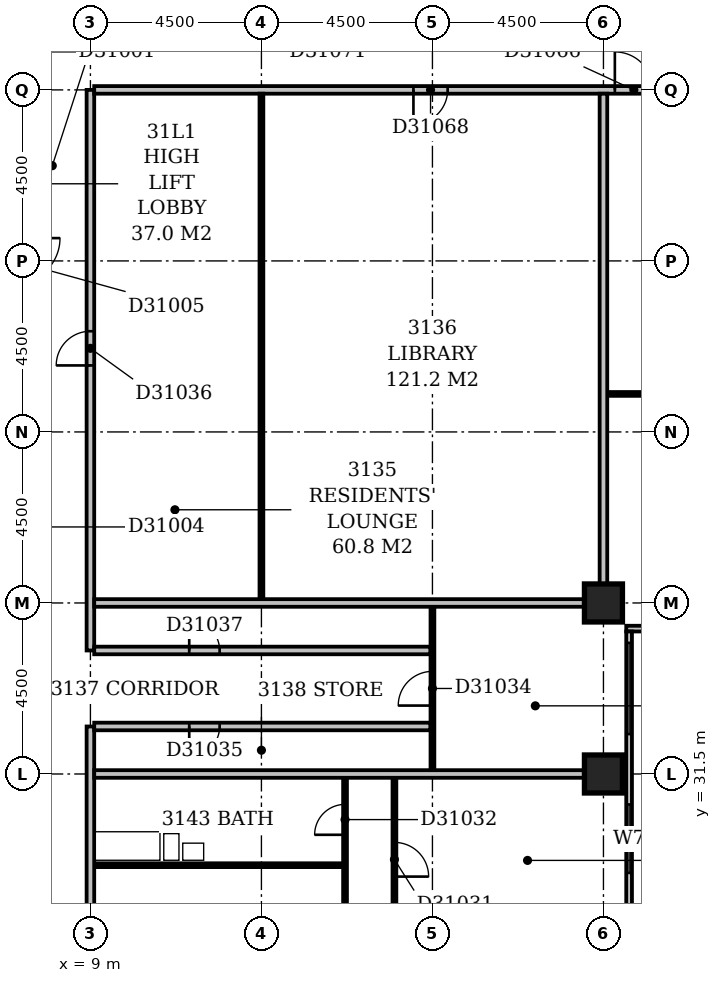
"""IFC4 building model, lengths in metres.
Left out: names, types, materials, properties, quantities, classifications, styles, units other than length and angle.
Written with IfcOpenShell. Run it as: python <this file> out.ifc"""

import sys

from ifc_helpers import new_model, si_unit, direction, frame, frame_2d, origin, origin_2d, place, context, subcontext, project, spatial, rectangle, extrude, element, fill, save


model = new_model("IFC4")
c1 = context("Model", 3, precision=1e-05, world=origin(), true_north=direction((0.0, 1.0)))
c2 = subcontext(c1, "Body", "Model", "MODEL_VIEW")
j1 = project(units=[si_unit("LENGTHUNIT", "METRE"), si_unit("PLANEANGLEUNIT", "RADIAN")], contexts=[c1])
p1 = place(None, origin())
s1 = spatial("IfcSite", under=j1, at=p1, CompositionType="ELEMENT")
p2 = place(p1, origin())
s2 = spatial("IfcBuilding", under=s1, at=p2, CompositionType="ELEMENT")
p3 = place(p2, frame((0.0, 0.0, 126.8)))
s3 = spatial("IfcBuildingStorey", under=s2, at=p3, CompositionType="ELEMENT", Elevation=126.8)
for number, where, z_axis, x_axis in (
    (1, (22.5, 31.5, -0.3), (0.0, 0.0, 1.0), (1.0, 0.0, 0.0)),
    (2, (22.5, 36.0, -0.3), (0.0, 0.0, 1.0), (1.0, 0.0, 0.0)),
):
    element("IfcColumn", number, at=place(p3, frame(where, z_axis=z_axis, x_axis=x_axis)), inside=s3, PredefinedType="COLUMN", context=c2, shape_type="SweptSolid", body=[
        extrude(rectangle(XDim=1.0, YDim=1.0, at=origin_2d()), origin(), (0.0, 0.0, 1.0), 3.6),
    ])
p4 = place(p3, frame((23.175, 17.4, 0.0), z_axis=(0.0, 0.0, 1.0), x_axis=(0.0, 1.0, 0.0)))
e3 = element("IfcWall", 3, at=p4, inside=s3, PredefinedType="STANDARD", context=c2, shape_type="SweptSolid", body=[
    extrude(rectangle(XDim=17.85, YDim=0.15, at=frame_2d((8.925, 0.0))), origin(), (0.0, 0.0, 1.0), 2.7),
])
p5 = place(p4, frame((1.65, 0.0, 0.6)))
e4 = element("IfcOpeningElement", 4, at=p5, cuts=e3, PredefinedType="OPENING", context=c2, shape_type="SweptSolid", body=[
    extrude(rectangle(XDim=2.4, YDim=1.8, at=frame_2d((1.2, 0.9))), frame((0.0, 0.087, 0.0), z_axis=(0.0, -1.0, 0.0), x_axis=(1.0, 0.0, 0.0)), (0.0, 0.0, 1.0), 0.174),
])
p6 = place(p4, frame((6.15, 0.0, 0.6)))
e5 = element("IfcOpeningElement", 5, at=p6, cuts=e3, PredefinedType="OPENING", context=c2, shape_type="SweptSolid", body=[
    extrude(rectangle(XDim=2.4, YDim=1.8, at=frame_2d((1.2, 0.9))), frame((0.0, 0.087, 0.0), z_axis=(0.0, -1.0, 0.0), x_axis=(1.0, 0.0, 0.0)), (0.0, 0.0, 1.0), 0.174),
])
p7 = place(p4, frame((11.498, 0.0, 0.6)))
e6 = element("IfcOpeningElement", 6, at=p7, cuts=e3, PredefinedType="OPENING", context=c2, shape_type="SweptSolid", body=[
    extrude(rectangle(XDim=1.8, YDim=1.8, at=frame_2d((0.9, 0.9))), frame((0.0, 0.087, 0.0), z_axis=(0.0, -1.0, 0.0), x_axis=(1.0, 0.0, 0.0)), (0.0, 0.0, 1.0), 0.174),
])
p8 = place(p4, frame((15.15, 0.0, 0.6)))
e7 = element("IfcOpeningElement", 7, at=p8, cuts=e3, PredefinedType="OPENING", context=c2, shape_type="SweptSolid", body=[
    extrude(rectangle(XDim=2.4, YDim=1.8, at=frame_2d((1.2, 0.9))), frame((0.0, 0.087, 0.0), z_axis=(0.0, -1.0, 0.0), x_axis=(1.0, 0.0, 0.0)), (0.0, 0.0, 1.0), 0.174),
])
p9 = place(p3, frame((23.1, 35.325, 0.0), z_axis=(0.0, 0.0, 1.0), x_axis=(1.0, 0.0, 0.0)))
e8 = element("IfcWall", 8, at=p9, inside=s3, PredefinedType="STANDARD", context=c2, shape_type="SweptSolid", body=[
    extrude(rectangle(XDim=45.15, YDim=0.15, at=frame_2d((22.575, 0.0))), origin(), (0.0, 0.0, 1.0), 2.7),
])
p10 = place(p9, frame((0.45, 0.0, 0.6)))
e9 = element("IfcOpeningElement", 9, at=p10, cuts=e8, PredefinedType="OPENING", context=c2, shape_type="SweptSolid", body=[
    extrude(rectangle(XDim=2.4, YDim=1.8, at=frame_2d((1.2, 0.9))), frame((0.0, 0.087, 0.0), z_axis=(0.0, -1.0, 0.0), x_axis=(1.0, 0.0, 0.0)), (0.0, 0.0, 1.0), 0.174),
])
p11 = place(p9, frame((4.743, 0.0, 0.6)))
e10 = element("IfcOpeningElement", 10, at=p11, cuts=e8, PredefinedType="OPENING", context=c2, shape_type="SweptSolid", body=[
    extrude(rectangle(XDim=1.8, YDim=1.8, at=frame_2d((0.9, 0.9))), frame((0.0, 0.087, 0.0), z_axis=(0.0, -1.0, 0.0), x_axis=(1.0, 0.0, 0.0)), (0.0, 0.0, 1.0), 0.174),
])
p12 = place(p9, frame((9.45, 0.0, 0.6)))
e11 = element("IfcOpeningElement", 11, at=p12, cuts=e8, PredefinedType="OPENING", context=c2, shape_type="SweptSolid", body=[
    extrude(rectangle(XDim=2.4, YDim=1.8, at=frame_2d((1.2, 0.9))), frame((0.0, 0.087, 0.0), z_axis=(0.0, -1.0, 0.0), x_axis=(1.0, 0.0, 0.0)), (0.0, 0.0, 1.0), 0.174),
])
p13 = place(p9, frame((13.95, 0.0, 0.6)))
e12 = element("IfcOpeningElement", 12, at=p13, cuts=e8, PredefinedType="OPENING", context=c2, shape_type="SweptSolid", body=[
    extrude(rectangle(XDim=2.4, YDim=1.8, at=frame_2d((1.2, 0.9))), frame((0.0, 0.087, 0.0), z_axis=(0.0, -1.0, 0.0), x_axis=(1.0, 0.0, 0.0)), (0.0, 0.0, 1.0), 0.174),
])
p14 = place(p9, frame((19.646, 0.0, 0.6)))
e13 = element("IfcOpeningElement", 13, at=p14, cuts=e8, PredefinedType="OPENING", context=c2, shape_type="SweptSolid", body=[
    extrude(rectangle(XDim=1.5, YDim=1.8, at=frame_2d((0.75, 0.9))), frame((0.0, 0.087, 0.0), z_axis=(0.0, -1.0, 0.0), x_axis=(1.0, 0.0, 0.0)), (0.0, 0.0, 1.0), 0.174),
])
p15 = place(p9, frame((22.95, 0.0, 0.6)))
e14 = element("IfcOpeningElement", 14, at=p15, cuts=e8, PredefinedType="OPENING", context=c2, shape_type="SweptSolid", body=[
    extrude(rectangle(XDim=2.4, YDim=1.8, at=frame_2d((1.2, 0.9))), frame((0.0, 0.087, 0.0), z_axis=(0.0, -1.0, 0.0), x_axis=(1.0, 0.0, 0.0)), (0.0, 0.0, 1.0), 0.174),
])
p16 = place(p9, frame((27.45, 0.0, 0.6)))
e15 = element("IfcOpeningElement", 15, at=p16, cuts=e8, PredefinedType="OPENING", context=c2, shape_type="SweptSolid", body=[
    extrude(rectangle(XDim=2.4, YDim=1.8, at=frame_2d((1.2, 0.9))), frame((0.0, 0.087, 0.0), z_axis=(0.0, -1.0, 0.0), x_axis=(1.0, 0.0, 0.0)), (0.0, 0.0, 1.0), 0.174),
])
p17 = place(p9, frame((31.95, 0.0, 0.6)))
e16 = element("IfcOpeningElement", 16, at=p17, cuts=e8, PredefinedType="OPENING", context=c2, shape_type="SweptSolid", body=[
    extrude(rectangle(XDim=2.4, YDim=1.8, at=frame_2d((1.2, 0.9))), frame((0.0, 0.087, 0.0), z_axis=(0.0, -1.0, 0.0), x_axis=(1.0, 0.0, 0.0)), (0.0, 0.0, 1.0), 0.174),
])
p18 = place(p9, frame((37.911, 0.0, 0.6)))
e17 = element("IfcOpeningElement", 17, at=p18, cuts=e8, PredefinedType="OPENING", context=c2, shape_type="SweptSolid", body=[
    extrude(rectangle(XDim=1.2, YDim=1.8, at=frame_2d((0.6, 0.9))), frame((0.0, 0.087, 0.0), z_axis=(0.0, -1.0, 0.0), x_axis=(1.0, 0.0, 0.0)), (0.0, 0.0, 1.0), 0.174),
])
p19 = place(p9, frame((40.95, 0.0, 0.6)))
e18 = element("IfcOpeningElement", 18, at=p19, cuts=e8, PredefinedType="OPENING", context=c2, shape_type="SweptSolid", body=[
    extrude(rectangle(XDim=2.4, YDim=1.8, at=frame_2d((1.2, 0.9))), frame((0.0, 0.087, 0.0), z_axis=(0.0, -1.0, 0.0), x_axis=(1.0, 0.0, 0.0)), (0.0, 0.0, 1.0), 0.174),
])
p20 = place(p3, frame((9.0, 5.0, 0.0), z_axis=(0.0, 0.0, 1.0), x_axis=(0.0, 1.0, 0.0)))
e19 = element("IfcWall", 19, at=p20, inside=s3, PredefinedType="PARTITIONING", context=c2, shape_type="SweptSolid", body=[
    extrude(rectangle(XDim=27.75, YDim=0.2, at=frame_2d((13.875, 0.0))), origin(), (0.0, 0.0, 1.0), 3.3),
])
p21 = place(p20, frame((17.8, 0.0, 0.0)))
e20 = element("IfcOpeningElement", 20, at=p21, cuts=e19, PredefinedType="OPENING", context=c2, shape_type="SweptSolid", body=[
    extrude(rectangle(XDim=1.0, YDim=2.1, at=frame_2d((0.5, 1.05))), frame((0.0, 0.112, 0.0), z_axis=(0.0, -1.0, 0.0), x_axis=(1.0, 0.0, 0.0)), (0.0, 0.0, 1.0), 0.224),
])
p22 = place(p20, frame((14.95, 0.0, 0.0)))
e21 = element("IfcOpeningElement", 21, at=p22, cuts=e19, PredefinedType="OPENING", context=c2, shape_type="SweptSolid", body=[
    extrude(rectangle(XDim=1.0, YDim=2.1, at=frame_2d((0.5, 1.05))), frame((0.0, 0.112, 0.0), z_axis=(0.0, -1.0, 0.0), x_axis=(1.0, 0.0, 0.0)), (0.0, 0.0, 1.0), 0.224),
])
p23 = place(p20, frame((9.3, 0.0, 0.0)))
e22 = element("IfcOpeningElement", 22, at=p23, cuts=e19, PredefinedType="OPENING", context=c2, shape_type="SweptSolid", body=[
    extrude(rectangle(XDim=1.0, YDim=2.1, at=frame_2d((0.5, 1.05))), frame((0.0, 0.112, 0.0), z_axis=(0.0, -1.0, 0.0), x_axis=(1.0, 0.0, 0.0)), (0.0, 0.0, 1.0), 0.224),
])
p24 = place(p20, frame((1.5, 0.0, 0.0)))
e23 = element("IfcOpeningElement", 23, at=p24, cuts=e19, PredefinedType="OPENING", context=c2, shape_type="SweptSolid", body=[
    extrude(rectangle(XDim=0.9, YDim=2.1, at=frame_2d((0.45, 1.05))), frame((0.0, 0.112, 0.0), z_axis=(0.0, -1.0, 0.0), x_axis=(1.0, 0.0, 0.0)), (0.0, 0.0, 1.0), 0.224),
])
p25 = place(p3, frame((17.0, 22.6, 0.0), z_axis=(0.0, 0.0, 1.0), x_axis=(0.0, 1.0, 0.0)))
e24 = element("IfcWall", 24, at=p25, inside=s3, PredefinedType="PARTITIONING", context=c2, shape_type="SweptSolid", body=[
    extrude(rectangle(XDim=8.8, YDim=0.1, at=frame_2d((4.4, 0.0))), origin(), (0.0, 0.0, 1.0), 3.3),
])
p26 = place(p25, frame((1.7, 0.0, 0.0)))
e25 = element("IfcOpeningElement", 25, at=p26, cuts=e24, PredefinedType="OPENING", context=c2, shape_type="SweptSolid", body=[
    extrude(rectangle(XDim=0.9, YDim=2.1, at=frame_2d((0.45, 1.05))), frame((0.0, 0.062, 0.0), z_axis=(0.0, -1.0, 0.0), x_axis=(1.0, 0.0, 0.0)), (0.0, 0.0, 1.0), 0.124),
])
p27 = place(p25, frame((6.2, 0.0, 0.0)))
e26 = element("IfcOpeningElement", 26, at=p27, cuts=e24, PredefinedType="OPENING", context=c2, shape_type="SweptSolid", body=[
    extrude(rectangle(XDim=0.9, YDim=2.1, at=frame_2d((0.45, 1.05))), frame((0.0, 0.062, 0.0), z_axis=(0.0, -1.0, 0.0), x_axis=(1.0, 0.0, 0.0)), (0.0, 0.0, 1.0), 0.124),
])
p28 = place(p3, frame((15.7, 24.1, 0.0), z_axis=(0.0, 0.0, 1.0), x_axis=(0.0, 1.0, 0.0)))
e27 = element("IfcWall", 27, at=p28, inside=s3, PredefinedType="PARTITIONING", context=c2, shape_type="SweptSolid", body=[
    extrude(rectangle(XDim=7.3, YDim=0.1, at=frame_2d((3.65, 0.0))), origin(), (0.0, 0.0, 1.0), 3.3),
])
p29 = place(p28, frame((5.8, 0.0, 0.0)))
e28 = element("IfcOpeningElement", 28, at=p29, cuts=e27, PredefinedType="OPENING", context=c2, shape_type="SweptSolid", body=[
    extrude(rectangle(XDim=0.8, YDim=2.1, at=frame_2d((0.4, 1.05))), frame((0.0, 0.062, 0.0), z_axis=(0.0, -1.0, 0.0), x_axis=(1.0, 0.0, 0.0)), (0.0, 0.0, 1.0), 0.124),
])
p30 = place(p28, frame((2.05, 0.0, 0.0)))
e29 = element("IfcOpeningElement", 29, at=p30, cuts=e27, PredefinedType="OPENING", context=c2, shape_type="SweptSolid", body=[
    extrude(rectangle(XDim=0.9, YDim=2.1, at=frame_2d((0.45, 1.05))), frame((0.0, 0.062, 0.0), z_axis=(0.0, -1.0, 0.0), x_axis=(1.0, 0.0, 0.0)), (0.0, 0.0, 1.0), 0.124),
])
p31 = place(p3, frame((9.1, 29.1, 0.0), z_axis=(0.0, 0.0, 1.0), x_axis=(1.0, 0.0, 0.0)))
e30 = element("IfcWall", 30, at=p31, inside=s3, PredefinedType="PLUMBINGWALL", context=c2, shape_type="SweptSolid", body=[
    extrude(rectangle(XDim=6.55, YDim=0.1, at=frame_2d((3.275, 0.0))), origin(), (0.0, 0.0, 1.0), 3.3),
])
p32 = place(p3, frame((9.1, 31.5, 0.0), z_axis=(0.0, 0.0, 1.0), x_axis=(1.0, 0.0, 0.0)))
e31 = element("IfcWall", 31, at=p32, inside=s3, PredefinedType="PARTITIONING", context=c2, shape_type="SweptSolid", body=[
    extrude(rectangle(XDim=12.9, YDim=0.2, at=frame_2d((6.45, 0.0))), origin(), (0.0, 0.0, 1.0), 3.3),
])
p33 = place(p3, frame((18.0, 31.6, 0.0), z_axis=(0.0, 0.0, 1.0), x_axis=(0.0, 1.0, 0.0)))
e32 = element("IfcWall", 32, at=p33, inside=s3, PredefinedType="PARTITIONING", context=c2, shape_type="SweptSolid", body=[
    extrude(rectangle(XDim=4.3, YDim=0.1, at=frame_2d((2.15, 0.0))), origin(), (0.0, 0.0, 1.0), 3.3),
])
p34 = place(p33, frame((1.7, 0.0, 0.0)))
e33 = element("IfcOpeningElement", 33, at=p34, cuts=e32, PredefinedType="OPENING", context=c2, shape_type="SweptSolid", body=[
    extrude(rectangle(XDim=0.9, YDim=2.1, at=frame_2d((0.45, 1.05))), frame((0.0, 0.062, 0.0), z_axis=(0.0, -1.0, 0.0), x_axis=(1.0, 0.0, 0.0)), (0.0, 0.0, 1.0), 0.124),
])
p35 = place(p3, frame((9.1, 32.75, 0.0), z_axis=(0.0, 0.0, 1.0), x_axis=(1.0, 0.0, 0.0)))
e34 = element("IfcWall", 34, at=p35, inside=s3, PredefinedType="PARTITIONING", context=c2, shape_type="SweptSolid", body=[
    extrude(rectangle(XDim=8.85, YDim=0.2, at=frame_2d((4.425, 0.0))), origin(), (0.0, 0.0, 1.0), 3.3),
])
p36 = place(p35, frame((2.5, 0.0, 0.0)))
e35 = element("IfcOpeningElement", 35, at=p36, cuts=e34, PredefinedType="OPENING", context=c2, shape_type="SweptSolid", body=[
    extrude(rectangle(XDim=0.8, YDim=2.1, at=frame_2d((0.4, 1.05))), frame((0.0, 0.112, 0.0), z_axis=(0.0, -1.0, 0.0), x_axis=(1.0, 0.0, 0.0)), (0.0, 0.0, 1.0), 0.224),
])
p37 = place(p3, frame((9.0, 34.75, 0.0), z_axis=(0.0, 0.0, 1.0), x_axis=(0.0, 1.0, 0.0)))
e36 = element("IfcWall", 36, at=p37, inside=s3, PredefinedType="PARTITIONING", context=c2, shape_type="SweptSolid", body=[
    extrude(rectangle(XDim=14.75, YDim=0.2, at=frame_2d((7.375, 0.0))), origin(), (0.0, 0.0, 1.0), 3.3),
])
p38 = place(p37, frame((7.5, 0.0, 0.0)))
e37 = element("IfcOpeningElement", 37, at=p38, cuts=e36, PredefinedType="OPENING", context=c2, shape_type="SweptSolid", body=[
    extrude(rectangle(XDim=0.9, YDim=2.1, at=frame_2d((0.45, 1.05))), frame((0.0, 0.112, 0.0), z_axis=(0.0, -1.0, 0.0), x_axis=(1.0, 0.0, 0.0)), (0.0, 0.0, 1.0), 0.224),
])
p39 = place(p3, frame((9.1, 34.75, 0.0), z_axis=(0.0, 0.0, 1.0), x_axis=(1.0, 0.0, 0.0)))
e38 = element("IfcWall", 38, at=p39, inside=s3, PredefinedType="PARTITIONING", context=c2, shape_type="SweptSolid", body=[
    extrude(rectangle(XDim=8.85, YDim=0.2, at=frame_2d((4.425, 0.0))), origin(), (0.0, 0.0, 1.0), 3.3),
])
p40 = place(p39, frame((2.5, 0.0, 0.0)))
e39 = element("IfcOpeningElement", 39, at=p40, cuts=e38, PredefinedType="OPENING", context=c2, shape_type="SweptSolid", body=[
    extrude(rectangle(XDim=0.8, YDim=2.1, at=frame_2d((0.4, 1.05))), frame((0.0, 0.112, 0.0), z_axis=(0.0, -1.0, 0.0), x_axis=(1.0, 0.0, 0.0)), (0.0, 0.0, 1.0), 0.224),
])
p41 = place(p3, frame((9.1, 36.0, 0.0), z_axis=(0.0, 0.0, 1.0), x_axis=(1.0, 0.0, 0.0)))
e40 = element("IfcWall", 40, at=p41, inside=s3, PredefinedType="PARTITIONING", context=c2, shape_type="SweptSolid", body=[
    extrude(rectangle(XDim=12.9, YDim=0.2, at=frame_2d((6.45, 0.0))), origin(), (0.0, 0.0, 1.0), 3.3),
])
p42 = place(p3, frame((13.5, 36.1, 0.0), z_axis=(0.0, 0.0, 1.0), x_axis=(0.0, 1.0, 0.0)))
e41 = element("IfcWall", 41, at=p42, inside=s3, PredefinedType="PARTITIONING", context=c2, shape_type="SweptSolid", body=[
    extrude(rectangle(XDim=13.3, YDim=0.1, at=frame_2d((6.65, 0.0))), origin(), (0.0, 0.0, 1.0), 3.3),
])
p43 = place(p3, frame((22.5, 36.5, 0.0), z_axis=(0.0, 0.0, 1.0), x_axis=(0.0, 1.0, 0.0)))
e42 = element("IfcWall", 42, at=p43, inside=s3, PredefinedType="PARTITIONING", context=c2, shape_type="SweptSolid", body=[
    extrude(rectangle(XDim=12.9, YDim=0.2, at=frame_2d((6.45, 0.0))), origin(), (0.0, 0.0, 1.0), 3.3),
])
p44 = place(p3, frame((22.6, 41.5, 0.0), z_axis=(0.0, 0.0, 1.0), x_axis=(1.0, 0.0, 0.0)))
e43 = element("IfcWall", 43, at=p44, inside=s3, PredefinedType="PARTITIONING", context=c2, shape_type="SweptSolid", body=[
    extrude(rectangle(XDim=8.8, YDim=0.1, at=frame_2d((4.4, 0.0))), origin(), (0.0, 0.0, 1.0), 3.3),
])
p45 = place(p44, frame((1.7, 0.0, 0.0)))
e44 = element("IfcOpeningElement", 44, at=p45, cuts=e43, PredefinedType="OPENING", context=c2, shape_type="SweptSolid", body=[
    extrude(rectangle(XDim=0.9, YDim=2.1, at=frame_2d((0.45, 1.05))), frame((0.0, 0.062, 0.0), z_axis=(0.0, -1.0, 0.0), x_axis=(1.0, 0.0, 0.0)), (0.0, 0.0, 1.0), 0.124),
])
p46 = place(p44, frame((6.2, 0.0, 0.0)))
e45 = element("IfcOpeningElement", 45, at=p46, cuts=e43, PredefinedType="OPENING", context=c2, shape_type="SweptSolid", body=[
    extrude(rectangle(XDim=0.9, YDim=2.1, at=frame_2d((0.45, 1.05))), frame((0.0, 0.062, 0.0), z_axis=(0.0, -1.0, 0.0), x_axis=(1.0, 0.0, 0.0)), (0.0, 0.0, 1.0), 0.124),
])
p47 = place(p3, frame((9.1, 49.5, 0.0), z_axis=(0.0, 0.0, 1.0), x_axis=(1.0, 0.0, 0.0)))
e46 = element("IfcWall", 46, at=p47, inside=s3, PredefinedType="PARTITIONING", context=c2, shape_type="SweptSolid", body=[
    extrude(rectangle(XDim=41.55, YDim=0.2, at=frame_2d((20.775, 0.0))), origin(), (0.0, 0.0, 1.0), 3.3),
])
p48 = place(p47, frame((13.7, 0.0, 0.0)))
e47 = element("IfcOpeningElement", 47, at=p48, cuts=e46, PredefinedType="OPENING", context=c2, shape_type="SweptSolid", body=[
    extrude(rectangle(XDim=1.0, YDim=2.1, at=frame_2d((0.5, 1.05))), frame((0.0, 0.112, 0.0), z_axis=(0.0, -1.0, 0.0), x_axis=(1.0, 0.0, 0.0)), (0.0, 0.0, 1.0), 0.224),
])
p49 = place(p47, frame((27.8, 0.0, 0.0)))
e48 = element("IfcOpeningElement", 48, at=p49, cuts=e46, PredefinedType="OPENING", context=c2, shape_type="SweptSolid", body=[
    extrude(rectangle(XDim=1.0, YDim=2.1, at=frame_2d((0.5, 1.05))), frame((0.0, 0.112, 0.0), z_axis=(0.0, -1.0, 0.0), x_axis=(1.0, 0.0, 0.0)), (0.0, 0.0, 1.0), 0.224),
])
p50 = place(p47, frame((8.4, 0.0, 0.0)))
e49 = element("IfcOpeningElement", 49, at=p50, cuts=e46, PredefinedType="OPENING", context=c2, shape_type="SweptSolid", body=[
    extrude(rectangle(XDim=0.9, YDim=2.1, at=frame_2d((0.45, 1.05))), frame((0.0, 0.112, 0.0), z_axis=(0.0, -1.0, 0.0), x_axis=(1.0, 0.0, 0.0)), (0.0, 0.0, 1.0), 0.224),
])
p51 = place(p7, origin())
e50 = element("IfcWindow", 50, at=p51, inside=s3, PartitioningType="SINGLE_PANEL", PredefinedType="WINDOW", context=c2, shape_type="SweptSolid", body=[
    extrude(rectangle(XDim=1.8, YDim=1.8, at=frame_2d((0.9, 0.9))), frame((0.0, 0.03, 0.0), z_axis=(0.0, -1.0, 0.0), x_axis=(1.0, 0.0, 0.0)), (0.0, 0.0, 1.0), 0.06),
])
fill(e6, e50)
p52 = place(p8, origin())
e51 = element("IfcWindow", 51, at=p52, inside=s3, PartitioningType="SINGLE_PANEL", PredefinedType="WINDOW", context=c2, shape_type="SweptSolid", body=[
    extrude(rectangle(XDim=2.4, YDim=1.8, at=frame_2d((1.2, 0.9))), frame((0.0, 0.03, 0.0), z_axis=(0.0, -1.0, 0.0), x_axis=(1.0, 0.0, 0.0)), (0.0, 0.0, 1.0), 0.06),
])
fill(e7, e51)
p53 = place(p27, frame((0.9, 0.0, 0.0), z_axis=(0.0, 0.0, 1.0), x_axis=(-1.0, 0.0, 0.0)))
e52 = element("IfcDoor", 52, at=p53, inside=s3, OperationType="SINGLE_SWING_RIGHT", PredefinedType="DOOR", context=c2, shape_type="SweptSolid", body=[
    extrude(rectangle(XDim=0.9, YDim=2.1, at=frame_2d((0.45, 1.05))), frame((0.0, 0.025, 0.0), z_axis=(0.0, -1.0, 0.0), x_axis=(1.0, 0.0, 0.0)), (0.0, 0.0, 1.0), 0.05),
])
fill(e26, e52)
p54 = place(p29, origin())
e53 = element("IfcDoor", 53, at=p54, inside=s3, OperationType="SINGLE_SWING_LEFT", PredefinedType="DOOR", context=c2, shape_type="SweptSolid", body=[
    extrude(rectangle(XDim=0.8, YDim=2.1, at=frame_2d((0.4, 1.05))), frame((0.0, 0.025, 0.0), z_axis=(0.0, -1.0, 0.0), x_axis=(1.0, 0.0, 0.0)), (0.0, 0.0, 1.0), 0.05),
])
fill(e28, e53)
p55 = place(p34, origin())
e54 = element("IfcDoor", 54, at=p55, inside=s3, OperationType="SINGLE_SWING_LEFT", PredefinedType="DOOR", context=c2, shape_type="SweptSolid", body=[
    extrude(rectangle(XDim=0.9, YDim=2.1, at=frame_2d((0.45, 1.05))), frame((0.0, 0.025, 0.0), z_axis=(0.0, -1.0, 0.0), x_axis=(1.0, 0.0, 0.0)), (0.0, 0.0, 1.0), 0.05),
])
fill(e33, e54)
p56 = place(p36, frame((0.8, 0.0, 0.0), z_axis=(0.0, 0.0, 1.0), x_axis=(-1.0, 0.0, 0.0)))
e55 = element("IfcDoor", 55, at=p56, inside=s3, OperationType="SINGLE_SWING_RIGHT", PredefinedType="DOOR", context=c2, shape_type="SweptSolid", body=[
    extrude(rectangle(XDim=0.8, YDim=2.1, at=frame_2d((0.4, 1.05))), frame((0.0, 0.025, 0.0), z_axis=(0.0, -1.0, 0.0), x_axis=(1.0, 0.0, 0.0)), (0.0, 0.0, 1.0), 0.05),
])
fill(e35, e55)
p57 = place(p38, origin())
e56 = element("IfcDoor", 56, at=p57, inside=s3, OperationType="SINGLE_SWING_LEFT", PredefinedType="DOOR", context=c2, shape_type="SweptSolid", body=[
    extrude(rectangle(XDim=0.9, YDim=2.1, at=frame_2d((0.45, 1.05))), frame((0.0, 0.025, 0.0), z_axis=(0.0, -1.0, 0.0), x_axis=(1.0, 0.0, 0.0)), (0.0, 0.0, 1.0), 0.05),
])
fill(e37, e56)
p58 = place(p40, origin())
e57 = element("IfcDoor", 57, at=p58, inside=s3, OperationType="SINGLE_SWING_LEFT", PredefinedType="DOOR", context=c2, shape_type="SweptSolid", body=[
    extrude(rectangle(XDim=0.8, YDim=2.1, at=frame_2d((0.4, 1.05))), frame((0.0, 0.025, 0.0), z_axis=(0.0, -1.0, 0.0), x_axis=(1.0, 0.0, 0.0)), (0.0, 0.0, 1.0), 0.05),
])
fill(e39, e57)
p59 = place(p48, origin())
e58 = element("IfcDoor", 58, at=p59, inside=s3, OperationType="SINGLE_SWING_LEFT", PredefinedType="DOOR", context=c2, shape_type="SweptSolid", body=[
    extrude(rectangle(XDim=1.0, YDim=2.1, at=frame_2d((0.5, 1.05))), frame((0.0, 0.025, 0.0), z_axis=(0.0, -1.0, 0.0), x_axis=(1.0, 0.0, 0.0)), (0.0, 0.0, 1.0), 0.05),
])
fill(e47, e58)
p60 = place(p50, frame((0.9, 0.0, 0.0), z_axis=(0.0, 0.0, 1.0), x_axis=(-1.0, 0.0, 0.0)))
e59 = element("IfcDoor", 59, at=p60, inside=s3, OperationType="SINGLE_SWING_RIGHT", PredefinedType="DOOR", context=c2, shape_type="SweptSolid", body=[
    extrude(rectangle(XDim=0.9, YDim=2.1, at=frame_2d((0.45, 1.05))), frame((0.0, 0.025, 0.0), z_axis=(0.0, -1.0, 0.0), x_axis=(1.0, 0.0, 0.0)), (0.0, 0.0, 1.0), 0.05),
])
fill(e49, e59)
save(model, sys.argv[1])
